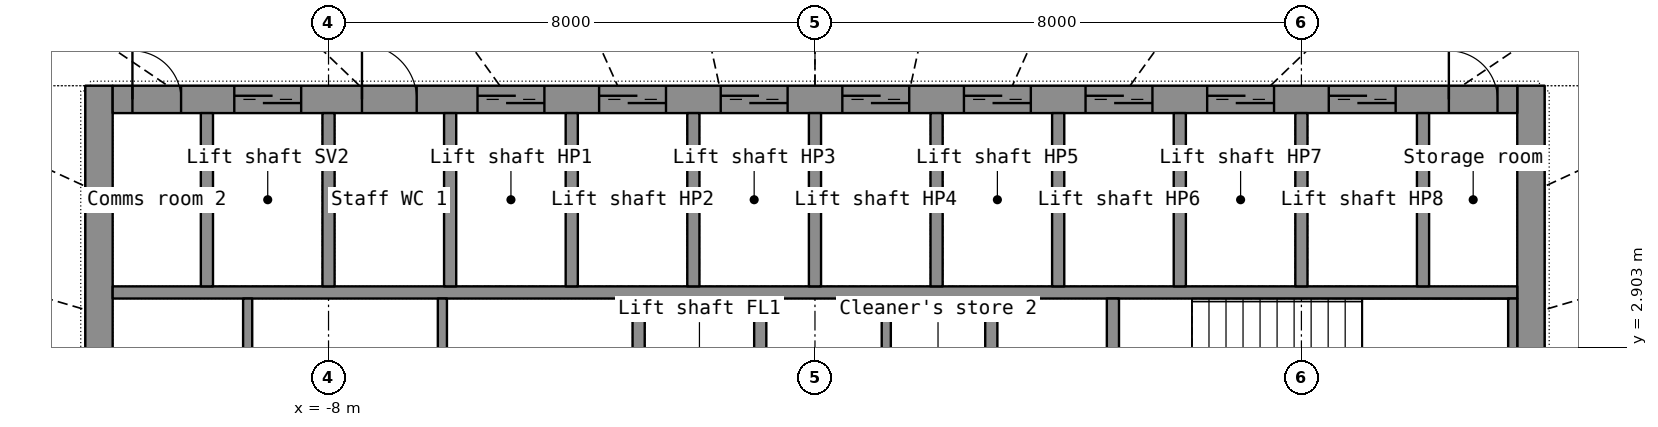
"""IFC4 building model, lengths in metres.
Left out: names, types, materials, properties, quantities, classifications, styles, units other than length and angle.
Written with IfcOpenShell. Run it as: python <this file> out.ifc"""

import sys

from ifc_helpers import new_model, si_unit, direction, frame, frame_2d, origin, place, context, subcontext, project, spatial, rectangle, extrude, element, fill, save


model = new_model("IFC4")
c1 = context("Model", 3, precision=1e-05, world=origin(), true_north=direction((0.0, 1.0)))
c2 = subcontext(c1, "Body", "Model", "MODEL_VIEW")
j1 = project(units=[si_unit("LENGTHUNIT", "METRE"), si_unit("PLANEANGLEUNIT", "RADIAN")], contexts=[c1])
p1 = place(None, origin())
s1 = spatial("IfcSite", under=j1, at=p1, CompositionType="ELEMENT")
p2 = place(p1, origin())
s2 = spatial("IfcBuilding", under=s1, at=p2, CompositionType="ELEMENT")
p3 = place(p2, frame((0.0, 0.0, 179.3)))
s3 = spatial("IfcBuildingStorey", under=s2, at=p3, CompositionType="ELEMENT", Elevation=179.3)
p4 = place(p3, frame((-11.775, -7.2, 0.0), z_axis=(0.0, 0.0, 1.0), x_axis=(0.0, 1.0, 0.0)))
e1 = element("IfcWall", 1, at=p4, inside=s3, PredefinedType="SHEAR", context=c2, shape_type="SweptSolid", body=[
    extrude(rectangle(XDim=14.4, YDim=0.45, at=frame_2d((7.2, 0.0))), origin(), (0.0, 0.0, 1.0), 3.3),
])
p5 = place(p4, frame((6.5, 0.0, 0.0)))
e2 = element("IfcOpeningElement", 2, at=p5, cuts=e1, PredefinedType="OPENING", context=c2, shape_type="SweptSolid", body=[
    extrude(rectangle(XDim=1.4, YDim=2.2, at=frame_2d((0.7, 1.1))), frame((0.0, 0.235, 0.0), z_axis=(0.0, -1.0, 0.0), x_axis=(1.0, 0.0, 0.0)), (0.0, 0.0, 1.0), 0.47),
])
p6 = place(p3, frame((11.775, -7.2, 0.0), z_axis=(0.0, 0.0, 1.0), x_axis=(0.0, 1.0, 0.0)))
e3 = element("IfcWall", 3, at=p6, inside=s3, PredefinedType="SHEAR", context=c2, shape_type="SweptSolid", body=[
    extrude(rectangle(XDim=14.4, YDim=0.45, at=frame_2d((7.2, 0.0))), origin(), (0.0, 0.0, 1.0), 3.3),
])
p7 = place(p6, frame((6.5, 0.0, 0.0)))
e4 = element("IfcOpeningElement", 4, at=p7, cuts=e3, PredefinedType="OPENING", context=c2, shape_type="SweptSolid", body=[
    extrude(rectangle(XDim=1.4, YDim=2.2, at=frame_2d((0.7, 1.1))), frame((0.0, 0.235, 0.0), z_axis=(0.0, -1.0, 0.0), x_axis=(1.0, 0.0, 0.0)), (0.0, 0.0, 1.0), 0.47),
])
p8 = place(p3, frame((-11.55, 6.975, 0.0), z_axis=(0.0, 0.0, 1.0), x_axis=(1.0, 0.0, 0.0)))
e5 = element("IfcWall", 5, at=p8, inside=s3, PredefinedType="SHEAR", context=c2, shape_type="SweptSolid", body=[
    extrude(rectangle(XDim=23.1, YDim=0.45, at=frame_2d((11.55, 0.0))), origin(), (0.0, 0.0, 1.0), 3.3),
])
p9 = place(p8, frame((2.0, 0.0, 0.0)))
e6 = element("IfcOpeningElement", 6, at=p9, cuts=e5, PredefinedType="OPENING", context=c2, shape_type="SweptSolid", body=[
    extrude(rectangle(XDim=1.1, YDim=2.2, at=frame_2d((0.55, 1.1))), frame((0.0, 0.235, 0.0), z_axis=(0.0, -1.0, 0.0), x_axis=(1.0, 0.0, 0.0)), (0.0, 0.0, 1.0), 0.47),
])
p10 = place(p8, frame((6.0, 0.0, 0.0)))
e7 = element("IfcOpeningElement", 7, at=p10, cuts=e5, PredefinedType="OPENING", context=c2, shape_type="SweptSolid", body=[
    extrude(rectangle(XDim=1.1, YDim=2.2, at=frame_2d((0.55, 1.1))), frame((0.0, 0.235, 0.0), z_axis=(0.0, -1.0, 0.0), x_axis=(1.0, 0.0, 0.0)), (0.0, 0.0, 1.0), 0.47),
])
p11 = place(p8, frame((8.0, 0.0, 0.0)))
e8 = element("IfcOpeningElement", 8, at=p11, cuts=e5, PredefinedType="OPENING", context=c2, shape_type="SweptSolid", body=[
    extrude(rectangle(XDim=1.1, YDim=2.2, at=frame_2d((0.55, 1.1))), frame((0.0, 0.235, 0.0), z_axis=(0.0, -1.0, 0.0), x_axis=(1.0, 0.0, 0.0)), (0.0, 0.0, 1.0), 0.47),
])
p12 = place(p8, frame((10.0, 0.0, 0.0)))
e9 = element("IfcOpeningElement", 9, at=p12, cuts=e5, PredefinedType="OPENING", context=c2, shape_type="SweptSolid", body=[
    extrude(rectangle(XDim=1.1, YDim=2.2, at=frame_2d((0.55, 1.1))), frame((0.0, 0.235, 0.0), z_axis=(0.0, -1.0, 0.0), x_axis=(1.0, 0.0, 0.0)), (0.0, 0.0, 1.0), 0.47),
])
p13 = place(p8, frame((12.0, 0.0, 0.0)))
e10 = element("IfcOpeningElement", 10, at=p13, cuts=e5, PredefinedType="OPENING", context=c2, shape_type="SweptSolid", body=[
    extrude(rectangle(XDim=1.1, YDim=2.2, at=frame_2d((0.55, 1.1))), frame((0.0, 0.235, 0.0), z_axis=(0.0, -1.0, 0.0), x_axis=(1.0, 0.0, 0.0)), (0.0, 0.0, 1.0), 0.47),
])
p14 = place(p8, frame((14.0, 0.0, 0.0)))
e11 = element("IfcOpeningElement", 11, at=p14, cuts=e5, PredefinedType="OPENING", context=c2, shape_type="SweptSolid", body=[
    extrude(rectangle(XDim=1.1, YDim=2.2, at=frame_2d((0.55, 1.1))), frame((0.0, 0.235, 0.0), z_axis=(0.0, -1.0, 0.0), x_axis=(1.0, 0.0, 0.0)), (0.0, 0.0, 1.0), 0.47),
])
p15 = place(p8, frame((16.0, 0.0, 0.0)))
e12 = element("IfcOpeningElement", 12, at=p15, cuts=e5, PredefinedType="OPENING", context=c2, shape_type="SweptSolid", body=[
    extrude(rectangle(XDim=1.1, YDim=2.2, at=frame_2d((0.55, 1.1))), frame((0.0, 0.235, 0.0), z_axis=(0.0, -1.0, 0.0), x_axis=(1.0, 0.0, 0.0)), (0.0, 0.0, 1.0), 0.47),
])
p16 = place(p8, frame((18.0, 0.0, 0.0)))
e13 = element("IfcOpeningElement", 13, at=p16, cuts=e5, PredefinedType="OPENING", context=c2, shape_type="SweptSolid", body=[
    extrude(rectangle(XDim=1.1, YDim=2.2, at=frame_2d((0.55, 1.1))), frame((0.0, 0.235, 0.0), z_axis=(0.0, -1.0, 0.0), x_axis=(1.0, 0.0, 0.0)), (0.0, 0.0, 1.0), 0.47),
])
p17 = place(p8, frame((20.0, 0.0, 0.0)))
e14 = element("IfcOpeningElement", 14, at=p17, cuts=e5, PredefinedType="OPENING", context=c2, shape_type="SweptSolid", body=[
    extrude(rectangle(XDim=1.1, YDim=2.2, at=frame_2d((0.55, 1.1))), frame((0.0, 0.235, 0.0), z_axis=(0.0, -1.0, 0.0), x_axis=(1.0, 0.0, 0.0)), (0.0, 0.0, 1.0), 0.47),
])
p18 = place(p8, frame((4.1, 0.0, 0.0)))
e15 = element("IfcOpeningElement", 15, at=p18, cuts=e5, PredefinedType="OPENING", context=c2, shape_type="SweptSolid", body=[
    extrude(rectangle(XDim=0.9, YDim=2.1, at=frame_2d((0.45, 1.05))), frame((0.0, 0.235, 0.0), z_axis=(0.0, -1.0, 0.0), x_axis=(1.0, 0.0, 0.0)), (0.0, 0.0, 1.0), 0.47),
])
p19 = place(p8, frame((0.325, 0.0, 0.0)))
e16 = element("IfcOpeningElement", 16, at=p19, cuts=e5, PredefinedType="OPENING", context=c2, shape_type="SweptSolid", body=[
    extrude(rectangle(XDim=0.8, YDim=2.05, at=frame_2d((0.4, 1.025))), frame((0.0, 0.235, 0.0), z_axis=(0.0, -1.0, 0.0), x_axis=(1.0, 0.0, 0.0)), (0.0, 0.0, 1.0), 0.47),
])
p20 = place(p8, frame((21.975, 0.0, 0.0)))
e17 = element("IfcOpeningElement", 17, at=p20, cuts=e5, PredefinedType="OPENING", context=c2, shape_type="SweptSolid", body=[
    extrude(rectangle(XDim=0.8, YDim=2.05, at=frame_2d((0.4, 1.025))), frame((0.0, 0.235, 0.0), z_axis=(0.0, -1.0, 0.0), x_axis=(1.0, 0.0, 0.0)), (0.0, 0.0, 1.0), 0.47),
])
p21 = place(p3, frame((-11.55, 3.8, 0.0), z_axis=(0.0, 0.0, 1.0), x_axis=(1.0, 0.0, 0.0)))
e18 = element("IfcWall", 18, at=p21, inside=s3, PredefinedType="SHEAR", context=c2, shape_type="SweptSolid", body=[
    extrude(rectangle(XDim=23.1, YDim=0.2, at=frame_2d((11.55, 0.0))), origin(), (0.0, 0.0, 1.0), 3.3),
])
for number, where, z_axis, x_axis in (
    (19, (-10.0, 3.9, 0.0), (0.0, 0.0, 1.0), (0.0, 1.0, 0.0)),
    (20, (-8.0, 3.9, 0.0), (0.0, 0.0, 1.0), (0.0, 1.0, 0.0)),
    (21, (-6.0, 3.9, 0.0), (0.0, 0.0, 1.0), (0.0, 1.0, 0.0)),
    (22, (-4.0, 3.9, 0.0), (0.0, 0.0, 1.0), (0.0, 1.0, 0.0)),
    (23, (-2.0, 3.9, 0.0), (0.0, 0.0, 1.0), (0.0, 1.0, 0.0)),
    (24, (0.0, 3.9, 0.0), (0.0, 0.0, 1.0), (0.0, 1.0, 0.0)),
    (25, (2.0, 3.9, 0.0), (0.0, 0.0, 1.0), (0.0, 1.0, 0.0)),
    (26, (4.0, 3.9, 0.0), (0.0, 0.0, 1.0), (0.0, 1.0, 0.0)),
    (27, (6.0, 3.9, 0.0), (0.0, 0.0, 1.0), (0.0, 1.0, 0.0)),
    (28, (8.0, 3.9, 0.0), (0.0, 0.0, 1.0), (0.0, 1.0, 0.0)),
    (29, (10.0, 3.9, 0.0), (0.0, 0.0, 1.0), (0.0, 1.0, 0.0)),
):
    element("IfcWall", number, at=place(p3, frame(where, z_axis=z_axis, x_axis=x_axis)), inside=s3, PredefinedType="SHEAR", context=c2, shape_type="SweptSolid", body=[
        extrude(rectangle(XDim=2.85, YDim=0.2, at=frame_2d((1.425, 0.0))), origin(), (0.0, 0.0, 1.0), 3.3),
    ])
p22 = place(p3, frame((-2.9, -3.7, 0.0), z_axis=(0.0, 0.0, 1.0), x_axis=(0.0, 1.0, 0.0)))
e30 = element("IfcWall", 30, at=p22, inside=s3, PredefinedType="SHEAR", context=c2, shape_type="SweptSolid", body=[
    extrude(rectangle(XDim=7.4, YDim=0.2, at=frame_2d((3.7, 0.0))), origin(), (0.0, 0.0, 1.0), 3.3),
])
p23 = place(p22, frame((3.1, 0.0, 0.0)))
e31 = element("IfcOpeningElement", 31, at=p23, cuts=e30, PredefinedType="OPENING", context=c2, shape_type="SweptSolid", body=[
    extrude(rectangle(XDim=1.2, YDim=2.2, at=frame_2d((0.6, 1.1))), frame((0.0, 0.11, 0.0), z_axis=(0.0, -1.0, 0.0), x_axis=(1.0, 0.0, 0.0)), (0.0, 0.0, 1.0), 0.22),
])
p24 = place(p3, frame((2.9, -3.7, 0.0), z_axis=(0.0, 0.0, 1.0), x_axis=(0.0, 1.0, 0.0)))
e32 = element("IfcWall", 32, at=p24, inside=s3, PredefinedType="SHEAR", context=c2, shape_type="SweptSolid", body=[
    extrude(rectangle(XDim=7.4, YDim=0.2, at=frame_2d((3.7, 0.0))), origin(), (0.0, 0.0, 1.0), 3.3),
])
p25 = place(p24, frame((3.1, 0.0, 0.0)))
e33 = element("IfcOpeningElement", 33, at=p25, cuts=e32, PredefinedType="OPENING", context=c2, shape_type="SweptSolid", body=[
    extrude(rectangle(XDim=1.2, YDim=2.2, at=frame_2d((0.6, 1.1))), frame((0.0, 0.11, 0.0), z_axis=(0.0, -1.0, 0.0), x_axis=(1.0, 0.0, 0.0)), (0.0, 0.0, 1.0), 0.22),
])
p26 = place(p3, frame((-0.9, 1.35, 0.0), z_axis=(0.0, 0.0, 1.0), x_axis=(0.0, 1.0, 0.0)))
e34 = element("IfcWall", 34, at=p26, inside=s3, PredefinedType="SHEAR", context=c2, shape_type="SweptSolid", body=[
    extrude(rectangle(XDim=2.35, YDim=0.2, at=frame_2d((1.175, 0.0))), origin(), (0.0, 0.0, 1.0), 3.3),
])
p27 = place(p3, frame((11.475, 1.35, 0.0), z_axis=(0.0, 0.0, 1.0), x_axis=(0.0, 1.0, 0.0)))
e35 = element("IfcWall", 35, at=p27, inside=s3, PredefinedType="SHEAR", context=c2, shape_type="SweptSolid", body=[
    extrude(rectangle(XDim=2.35, YDim=0.15, at=frame_2d((1.175, 0.0))), origin(), (0.0, 0.0, 1.0), 3.3),
])
p28 = place(p3, frame((4.9, 1.35, 0.0), z_axis=(0.0, 0.0, 1.0), x_axis=(0.0, 1.0, 0.0)))
e36 = element("IfcWall", 36, at=p28, inside=s3, PredefinedType="SHEAR", context=c2, shape_type="SweptSolid", body=[
    extrude(rectangle(XDim=2.35, YDim=0.2, at=frame_2d((1.175, 0.0))), origin(), (0.0, 0.0, 1.0), 3.3),
])
for number, where, z_axis, x_axis in (
    (37, (-9.33, 1.35, 0.0), (0.0, 0.0, 1.0), (0.0, 1.0, 0.0)),
    (38, (-6.127, 1.35, 0.0), (0.0, 0.0, 1.0), (0.0, 1.0, 0.0)),
    (39, (1.173, 1.35, 0.0), (0.0, 0.0, 1.0), (0.0, 1.0, 0.0)),
):
    element("IfcWall", number, at=place(p3, frame(where, z_axis=z_axis, x_axis=x_axis)), inside=s3, PredefinedType="PARTITIONING", context=c2, shape_type="SweptSolid", body=[
        extrude(rectangle(XDim=2.35, YDim=0.15, at=frame_2d((1.175, 0.0))), origin(), (0.0, 0.0, 1.0), 3.3),
    ])
p29 = place(p9, origin())
e40 = element("IfcDoor", 40, at=p29, inside=s3, OperationType="DOUBLE_DOOR_SLIDING", PredefinedType="DOOR", context=c2, shape_type="SweptSolid", body=[
    extrude(rectangle(XDim=1.1, YDim=2.2, at=frame_2d((0.55, 1.1))), frame((0.0, 0.025, 0.0), z_axis=(0.0, -1.0, 0.0), x_axis=(1.0, 0.0, 0.0)), (0.0, 0.0, 1.0), 0.05),
])
fill(e6, e40)
p30 = place(p10, origin())
e41 = element("IfcDoor", 41, at=p30, inside=s3, OperationType="DOUBLE_DOOR_SLIDING", PredefinedType="DOOR", context=c2, shape_type="SweptSolid", body=[
    extrude(rectangle(XDim=1.1, YDim=2.2, at=frame_2d((0.55, 1.1))), frame((0.0, 0.025, 0.0), z_axis=(0.0, -1.0, 0.0), x_axis=(1.0, 0.0, 0.0)), (0.0, 0.0, 1.0), 0.05),
])
fill(e7, e41)
p31 = place(p11, origin())
e42 = element("IfcDoor", 42, at=p31, inside=s3, OperationType="DOUBLE_DOOR_SLIDING", PredefinedType="DOOR", context=c2, shape_type="SweptSolid", body=[
    extrude(rectangle(XDim=1.1, YDim=2.2, at=frame_2d((0.55, 1.1))), frame((0.0, 0.025, 0.0), z_axis=(0.0, -1.0, 0.0), x_axis=(1.0, 0.0, 0.0)), (0.0, 0.0, 1.0), 0.05),
])
fill(e8, e42)
p32 = place(p12, origin())
e43 = element("IfcDoor", 43, at=p32, inside=s3, OperationType="DOUBLE_DOOR_SLIDING", PredefinedType="DOOR", context=c2, shape_type="SweptSolid", body=[
    extrude(rectangle(XDim=1.1, YDim=2.2, at=frame_2d((0.55, 1.1))), frame((0.0, 0.025, 0.0), z_axis=(0.0, -1.0, 0.0), x_axis=(1.0, 0.0, 0.0)), (0.0, 0.0, 1.0), 0.05),
])
fill(e9, e43)
p33 = place(p13, origin())
e44 = element("IfcDoor", 44, at=p33, inside=s3, OperationType="DOUBLE_DOOR_SLIDING", PredefinedType="DOOR", context=c2, shape_type="SweptSolid", body=[
    extrude(rectangle(XDim=1.1, YDim=2.2, at=frame_2d((0.55, 1.1))), frame((0.0, 0.025, 0.0), z_axis=(0.0, -1.0, 0.0), x_axis=(1.0, 0.0, 0.0)), (0.0, 0.0, 1.0), 0.05),
])
fill(e10, e44)
p34 = place(p14, origin())
e45 = element("IfcDoor", 45, at=p34, inside=s3, OperationType="DOUBLE_DOOR_SLIDING", PredefinedType="DOOR", context=c2, shape_type="SweptSolid", body=[
    extrude(rectangle(XDim=1.1, YDim=2.2, at=frame_2d((0.55, 1.1))), frame((0.0, 0.025, 0.0), z_axis=(0.0, -1.0, 0.0), x_axis=(1.0, 0.0, 0.0)), (0.0, 0.0, 1.0), 0.05),
])
fill(e11, e45)
p35 = place(p15, origin())
e46 = element("IfcDoor", 46, at=p35, inside=s3, OperationType="DOUBLE_DOOR_SLIDING", PredefinedType="DOOR", context=c2, shape_type="SweptSolid", body=[
    extrude(rectangle(XDim=1.1, YDim=2.2, at=frame_2d((0.55, 1.1))), frame((0.0, 0.025, 0.0), z_axis=(0.0, -1.0, 0.0), x_axis=(1.0, 0.0, 0.0)), (0.0, 0.0, 1.0), 0.05),
])
fill(e12, e46)
p36 = place(p16, origin())
e47 = element("IfcDoor", 47, at=p36, inside=s3, OperationType="DOUBLE_DOOR_SLIDING", PredefinedType="DOOR", context=c2, shape_type="SweptSolid", body=[
    extrude(rectangle(XDim=1.1, YDim=2.2, at=frame_2d((0.55, 1.1))), frame((0.0, 0.025, 0.0), z_axis=(0.0, -1.0, 0.0), x_axis=(1.0, 0.0, 0.0)), (0.0, 0.0, 1.0), 0.05),
])
fill(e13, e47)
p37 = place(p17, origin())
e48 = element("IfcDoor", 48, at=p37, inside=s3, OperationType="DOUBLE_DOOR_SLIDING", PredefinedType="DOOR", context=c2, shape_type="SweptSolid", body=[
    extrude(rectangle(XDim=1.1, YDim=2.2, at=frame_2d((0.55, 1.1))), frame((0.0, 0.025, 0.0), z_axis=(0.0, -1.0, 0.0), x_axis=(1.0, 0.0, 0.0)), (0.0, 0.0, 1.0), 0.05),
])
fill(e14, e48)
p38 = place(p18, origin())
e49 = element("IfcDoor", 49, at=p38, inside=s3, OperationType="SINGLE_SWING_LEFT", PredefinedType="DOOR", context=c2, shape_type="SweptSolid", body=[
    extrude(rectangle(XDim=0.9, YDim=2.1, at=frame_2d((0.45, 1.05))), frame((0.0, 0.025, 0.0), z_axis=(0.0, -1.0, 0.0), x_axis=(1.0, 0.0, 0.0)), (0.0, 0.0, 1.0), 0.05),
])
fill(e15, e49)
p39 = place(p19, origin())
e50 = element("IfcDoor", 50, at=p39, inside=s3, OperationType="SINGLE_SWING_LEFT", PredefinedType="DOOR", context=c2, shape_type="SweptSolid", body=[
    extrude(rectangle(XDim=0.8, YDim=2.05, at=frame_2d((0.4, 1.025))), frame((0.0, 0.025, 0.0), z_axis=(0.0, -1.0, 0.0), x_axis=(1.0, 0.0, 0.0)), (0.0, 0.0, 1.0), 0.05),
])
fill(e16, e50)
p40 = place(p20, origin())
e51 = element("IfcDoor", 51, at=p40, inside=s3, OperationType="SINGLE_SWING_LEFT", PredefinedType="DOOR", context=c2, shape_type="SweptSolid", body=[
    extrude(rectangle(XDim=0.8, YDim=2.05, at=frame_2d((0.4, 1.025))), frame((0.0, 0.025, 0.0), z_axis=(0.0, -1.0, 0.0), x_axis=(1.0, 0.0, 0.0)), (0.0, 0.0, 1.0), 0.05),
])
fill(e17, e51)
save(model, sys.argv[1])
